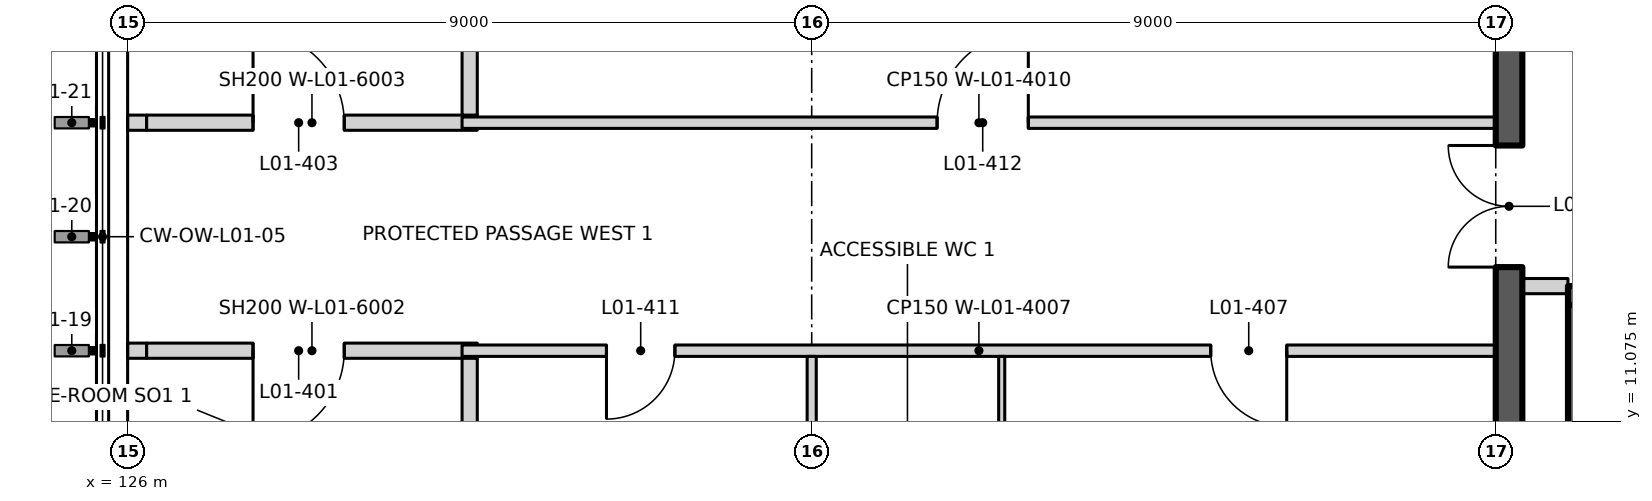
"""IFC4 building model, lengths in metres.
Left out: names, types, materials, properties, quantities, classifications, styles, units other than length and angle.
Written with IfcOpenShell. Run it as: python <this file> out.ifc"""

import sys

from ifc_helpers import new_model, si_unit, direction, frame, frame_2d, origin, place, context, subcontext, project, spatial, rectangle, extrude, element, fill, save


model = new_model("IFC4")
c1 = context("Model", 3, precision=1e-05, world=origin(), true_north=direction((0.0, 1.0)))
c2 = subcontext(c1, "Body", "Model", "MODEL_VIEW")
j1 = project(units=[si_unit("LENGTHUNIT", "METRE"), si_unit("PLANEANGLEUNIT", "RADIAN")], contexts=[c1])
p1 = place(None, origin())
s1 = spatial("IfcSite", under=j1, at=p1, CompositionType="ELEMENT")
p2 = place(p1, origin())
s2 = spatial("IfcBuilding", under=s1, at=p2, CompositionType="ELEMENT")
p3 = place(p2, frame((0.0, 0.0, 6.0)))
s3 = spatial("IfcBuildingStorey", under=s2, at=p3, CompositionType="ELEMENT", Elevation=6.0)
p4 = place(p3, frame((144.95, 12.725, 0.0), z_axis=(0.0, 0.0, 1.0), x_axis=(1.0, 0.0, 0.0)))
e1 = element("IfcWall", 1, at=p4, inside=s3, PredefinedType="SHEAR", context=c2, shape_type="SweptSolid", body=[
    extrude(rectangle(XDim=12.05, YDim=0.25, at=frame_2d((6.025, 0.0))), origin(), (0.0, 0.0, 1.0), 4.5),
])
p5 = place(p4, frame((1.05, 0.0, 0.0)))
e2 = element("IfcOpeningElement", 2, at=p5, cuts=e1, PredefinedType="OPENING", context=c2, shape_type="SweptSolid", body=[
    extrude(rectangle(XDim=1.1, YDim=2.1, at=frame_2d((0.55, 1.05))), frame((0.0, 0.135, 0.0), z_axis=(0.0, -1.0, 0.0), x_axis=(1.0, 0.0, 0.0)), (0.0, 0.0, 1.0), 0.27),
])
p6 = place(p4, frame((4.0, 0.0, 0.0)))
e3 = element("IfcOpeningElement", 3, at=p6, cuts=e1, PredefinedType="OPENING", context=c2, shape_type="SweptSolid", body=[
    extrude(rectangle(XDim=1.1, YDim=2.1, at=frame_2d((0.55, 1.05))), frame((0.0, 0.135, 0.0), z_axis=(0.0, -1.0, 0.0), x_axis=(1.0, 0.0, 0.0)), (0.0, 0.0, 1.0), 0.27),
])
p7 = place(p4, frame((6.95, 0.0, 0.0)))
e4 = element("IfcOpeningElement", 4, at=p7, cuts=e1, PredefinedType="OPENING", context=c2, shape_type="SweptSolid", body=[
    extrude(rectangle(XDim=1.1, YDim=2.1, at=frame_2d((0.55, 1.05))), frame((0.0, 0.135, 0.0), z_axis=(0.0, -1.0, 0.0), x_axis=(1.0, 0.0, 0.0)), (0.0, 0.0, 1.0), 0.27),
])
p8 = place(p4, frame((9.9, 0.0, 0.0)))
e5 = element("IfcOpeningElement", 5, at=p8, cuts=e1, PredefinedType="OPENING", context=c2, shape_type="SweptSolid", body=[
    extrude(rectangle(XDim=1.1, YDim=2.1, at=frame_2d((0.55, 1.05))), frame((0.0, 0.135, 0.0), z_axis=(0.0, -1.0, 0.0), x_axis=(1.0, 0.0, 0.0)), (0.0, 0.0, 1.0), 0.27),
])
p9 = place(p3, frame((145.075, 9.9, 0.0), z_axis=(0.0, 0.0, 1.0), x_axis=(0.0, 1.0, 0.0)))
e6 = element("IfcWall", 6, at=p9, inside=s3, PredefinedType="SHEAR", context=c2, shape_type="SweptSolid", body=[
    extrude(rectangle(XDim=2.7, YDim=0.25, at=frame_2d((1.35, 0.0))), origin(), (0.0, 0.0, 1.0), 4.5),
])
p10 = place(p3, frame((126.0, 12.0, 0.0), z_axis=(0.0, 0.0, 1.0), x_axis=(1.0, 0.0, 0.0)))
e7 = element("IfcWall", 7, at=p10, inside=s3, PredefinedType="PARTITIONING", context=c2, shape_type="SweptSolid", body=[
    extrude(rectangle(XDim=0.25, YDim=0.2, at=frame_2d((0.125, 0.0))), origin(), (0.0, 0.0, 1.0), 3.6),
])
p11 = place(p3, frame((126.25, 12.0, 0.0), z_axis=(0.0, 0.0, 1.0), x_axis=(1.0, 0.0, 0.0)))
e8 = element("IfcWall", 8, at=p11, inside=s3, PredefinedType="PARTITIONING", context=c2, shape_type="SweptSolid", body=[
    extrude(rectangle(XDim=4.35, YDim=0.2, at=frame_2d((2.175, 0.0))), origin(), (0.0, 0.0, 1.0), 4.2),
])
p12 = place(p11, frame((2.6, 0.0, 0.0), z_axis=(0.0, 0.0, 1.0), x_axis=(-1.0, 0.0, 0.0)))
e9 = element("IfcOpeningElement", 9, at=p12, cuts=e8, PredefinedType="OPENING", context=c2, shape_type="SweptSolid", body=[
    extrude(rectangle(XDim=1.2, YDim=2.1, at=frame_2d((0.6, 1.05))), frame((0.0, 0.11, 0.0), z_axis=(0.0, -1.0, 0.0), x_axis=(1.0, 0.0, 0.0)), (0.0, 0.0, 1.0), 0.22),
])
p13 = place(p3, frame((130.4, 12.0, 0.0), z_axis=(0.0, 0.0, 1.0), x_axis=(1.0, 0.0, 0.0)))
e10 = element("IfcWall", 10, at=p13, inside=s3, PredefinedType="PARTITIONING", context=c2, shape_type="SweptSolid", body=[
    extrude(rectangle(XDim=13.6, YDim=0.15, at=frame_2d((6.8, 0.0))), origin(), (0.0, 0.0, 1.0), 4.2),
])
p14 = place(p13, frame((10.85, 0.0, 0.0), z_axis=(0.0, 0.0, 1.0), x_axis=(-1.0, 0.0, 0.0)))
e11 = element("IfcOpeningElement", 11, at=p14, cuts=e10, PredefinedType="OPENING", context=c2, shape_type="SweptSolid", body=[
    extrude(rectangle(XDim=1.0, YDim=2.1, at=frame_2d((0.5, 1.05))), frame((0.0, 0.085, 0.0), z_axis=(0.0, -1.0, 0.0), x_axis=(1.0, 0.0, 0.0)), (0.0, 0.0, 1.0), 0.17),
])
p15 = place(p13, frame((2.8, 0.0, 0.0), z_axis=(0.0, 0.0, 1.0), x_axis=(-1.0, 0.0, 0.0)))
e12 = element("IfcOpeningElement", 12, at=p15, cuts=e10, PredefinedType="OPENING", context=c2, shape_type="SweptSolid", body=[
    extrude(rectangle(XDim=0.9, YDim=2.1, at=frame_2d((0.45, 1.05))), frame((0.0, 0.085, 0.0), z_axis=(0.0, -1.0, 0.0), x_axis=(1.0, 0.0, 0.0)), (0.0, 0.0, 1.0), 0.17),
])
p16 = place(p3, frame((144.35, 12.85, 0.0), z_axis=(0.0, 0.0, 1.0), x_axis=(1.0, 0.0, 0.0)))
e13 = element("IfcWall", 13, at=p16, inside=s3, PredefinedType="PARTITIONING", context=c2, shape_type="SweptSolid", body=[
    extrude(rectangle(XDim=0.6, YDim=0.2, at=frame_2d((0.3, 0.0))), origin(), (0.0, 0.0, 1.0), 4.2),
])
p17 = place(p3, frame((126.0, 15.0, 0.0), z_axis=(0.0, 0.0, 1.0), x_axis=(1.0, 0.0, 0.0)))
e14 = element("IfcWall", 14, at=p17, inside=s3, PredefinedType="PARTITIONING", context=c2, shape_type="SweptSolid", body=[
    extrude(rectangle(XDim=0.25, YDim=0.2, at=frame_2d((0.125, 0.0))), origin(), (0.0, 0.0, 1.0), 3.6),
])
p18 = place(p3, frame((126.25, 15.0, 0.0), z_axis=(0.0, 0.0, 1.0), x_axis=(1.0, 0.0, 0.0)))
e15 = element("IfcWall", 15, at=p18, inside=s3, PredefinedType="PARTITIONING", context=c2, shape_type="SweptSolid", body=[
    extrude(rectangle(XDim=4.35, YDim=0.2, at=frame_2d((2.175, 0.0))), origin(), (0.0, 0.0, 1.0), 4.2),
])
p19 = place(p18, frame((1.4, 0.0, 0.0)))
e16 = element("IfcOpeningElement", 16, at=p19, cuts=e15, PredefinedType="OPENING", context=c2, shape_type="SweptSolid", body=[
    extrude(rectangle(XDim=1.2, YDim=2.1, at=frame_2d((0.6, 1.05))), frame((0.0, 0.11, 0.0), z_axis=(0.0, -1.0, 0.0), x_axis=(1.0, 0.0, 0.0)), (0.0, 0.0, 1.0), 0.22),
])
p20 = place(p3, frame((130.4, 15.0, 0.0), z_axis=(0.0, 0.0, 1.0), x_axis=(1.0, 0.0, 0.0)))
e17 = element("IfcWall", 17, at=p20, inside=s3, PredefinedType="PARTITIONING", context=c2, shape_type="SweptSolid", body=[
    extrude(rectangle(XDim=13.6, YDim=0.15, at=frame_2d((6.8, 0.0))), origin(), (0.0, 0.0, 1.0), 4.2),
])
p21 = place(p20, frame((6.25, 0.0, 0.0)))
e18 = element("IfcOpeningElement", 18, at=p21, cuts=e17, PredefinedType="OPENING", context=c2, shape_type="SweptSolid", body=[
    extrude(rectangle(XDim=1.2, YDim=2.1, at=frame_2d((0.6, 1.05))), frame((0.0, 0.085, 0.0), z_axis=(0.0, -1.0, 0.0), x_axis=(1.0, 0.0, 0.0)), (0.0, 0.0, 1.0), 0.17),
])
for number, where, z_axis, x_axis in (
    (19, (130.5, 9.0, 0.0), (0.0, 0.0, 1.0), (0.0, 1.0, 0.0)),
    (20, (130.5, 15.1, 0.0), (0.0, 0.0, 1.0), (0.0, 1.0, 0.0)),
):
    element("IfcWall", number, at=place(p3, frame(where, z_axis=z_axis, x_axis=x_axis)), inside=s3, PredefinedType="PARTITIONING", context=c2, shape_type="SweptSolid", body=[
        extrude(rectangle(XDim=2.9, YDim=0.2, at=frame_2d((1.45, 0.0))), origin(), (0.0, 0.0, 1.0), 4.2),
    ])
p22 = place(p3, frame((135.0, 9.5, 0.0), z_axis=(0.0, 0.0, 1.0), x_axis=(0.0, 1.0, 0.0)))
e21 = element("IfcWall", 21, at=p22, inside=s3, PredefinedType="PARTITIONING", context=c2, shape_type="SweptSolid", body=[
    extrude(rectangle(XDim=2.425, YDim=0.12, at=frame_2d((1.212, 0.0))), origin(), (0.0, 0.0, 1.0), 4.2),
])
p23 = place(p3, frame((137.5, 7.54, 0.0), z_axis=(0.0, 0.0, 1.0), x_axis=(0.0, 1.0, 0.0)))
e22 = element("IfcWall", 22, at=p23, inside=s3, PredefinedType="PARTITIONING", context=c2, shape_type="SweptSolid", body=[
    extrude(rectangle(XDim=4.385, YDim=0.08, at=frame_2d((2.192, 0.0))), origin(), (0.0, 0.0, 1.0), 4.2),
])
p24 = place(p23, frame((1.71, 0.0, 0.0)))
e23 = element("IfcOpeningElement", 23, at=p24, cuts=e22, PredefinedType="OPENING", context=c2, shape_type="SweptSolid", body=[
    extrude(rectangle(XDim=1.0, YDim=2.1, at=frame_2d((0.5, 1.05))), frame((0.0, 0.05, 0.0), z_axis=(0.0, -1.0, 0.0), x_axis=(1.0, 0.0, 0.0)), (0.0, 0.0, 1.0), 0.1),
])
p25 = place(p3, frame((144.175, 9.35, 0.0), z_axis=(0.0, 0.0, 1.0), x_axis=(0.0, 1.0, 0.0)))
e24 = element("IfcWall", 24, at=p25, inside=s3, PredefinedType="SHEAR", context=c2, shape_type="SweptSolid", body=[
    extrude(rectangle(XDim=17.4, YDim=0.35, at=frame_2d((8.7, 0.0))), origin(), (0.0, 0.0, 1.0), 4.2),
])
p26 = place(p25, frame((3.75, 0.0, 0.0)))
e25 = element("IfcOpeningElement", 25, at=p26, cuts=e24, PredefinedType="OPENING", context=c2, shape_type="SweptSolid", body=[
    extrude(rectangle(XDim=1.6, YDim=2.4, at=frame_2d((0.8, 1.2))), frame((0.0, 0.185, 0.0), z_axis=(0.0, -1.0, 0.0), x_axis=(1.0, 0.0, 0.0)), (0.0, 0.0, 1.0), 0.37),
])
p27 = place(p12, origin())
e26 = element("IfcDoor", 26, at=p27, inside=s3, OperationType="SINGLE_SWING_RIGHT", PredefinedType="DOOR", context=c2, shape_type="SweptSolid", body=[
    extrude(rectangle(XDim=1.2, YDim=2.1, at=frame_2d((0.6, 1.05))), frame((0.0, 0.025, 0.0), z_axis=(0.0, -1.0, 0.0), x_axis=(1.0, 0.0, 0.0)), (0.0, 0.0, 1.0), 0.05),
])
fill(e9, e26)
p28 = place(p19, origin())
e27 = element("IfcDoor", 27, at=p28, inside=s3, OperationType="SINGLE_SWING_LEFT", PredefinedType="DOOR", context=c2, shape_type="SweptSolid", body=[
    extrude(rectangle(XDim=1.2, YDim=2.1, at=frame_2d((0.6, 1.05))), frame((0.0, 0.025, 0.0), z_axis=(0.0, -1.0, 0.0), x_axis=(1.0, 0.0, 0.0)), (0.0, 0.0, 1.0), 0.05),
])
fill(e16, e27)
p29 = place(p26, origin())
e28 = element("IfcDoor", 28, at=p29, inside=s3, OperationType="DOUBLE_DOOR_SINGLE_SWING", PredefinedType="DOOR", context=c2, shape_type="SweptSolid", body=[
    extrude(rectangle(XDim=1.6, YDim=2.4, at=frame_2d((0.8, 1.2))), frame((0.0, 0.025, 0.0), z_axis=(0.0, -1.0, 0.0), x_axis=(1.0, 0.0, 0.0)), (0.0, 0.0, 1.0), 0.05),
])
fill(e25, e28)
p30 = place(p14, origin())
e29 = element("IfcDoor", 29, at=p30, inside=s3, OperationType="SINGLE_SWING_LEFT", PredefinedType="DOOR", context=c2, shape_type="SweptSolid", body=[
    extrude(rectangle(XDim=1.0, YDim=2.1, at=frame_2d((0.5, 1.05))), frame((0.0, 0.025, 0.0), z_axis=(0.0, -1.0, 0.0), x_axis=(1.0, 0.0, 0.0)), (0.0, 0.0, 1.0), 0.05),
])
fill(e11, e29)
p31 = place(p15, origin())
e30 = element("IfcDoor", 30, at=p31, inside=s3, OperationType="SINGLE_SWING_RIGHT", PredefinedType="DOOR", context=c2, shape_type="SweptSolid", body=[
    extrude(rectangle(XDim=0.9, YDim=2.1, at=frame_2d((0.45, 1.05))), frame((0.0, 0.025, 0.0), z_axis=(0.0, -1.0, 0.0), x_axis=(1.0, 0.0, 0.0)), (0.0, 0.0, 1.0), 0.05),
])
fill(e12, e30)
p32 = place(p21, origin())
e31 = element("IfcDoor", 31, at=p32, inside=s3, OperationType="SINGLE_SWING_RIGHT", PredefinedType="DOOR", context=c2, shape_type="SweptSolid", body=[
    extrude(rectangle(XDim=1.2, YDim=2.1, at=frame_2d((0.6, 1.05))), frame((0.0, 0.025, 0.0), z_axis=(0.0, -1.0, 0.0), x_axis=(1.0, 0.0, 0.0)), (0.0, 0.0, 1.0), 0.05),
])
fill(e18, e31)
save(model, sys.argv[1])
